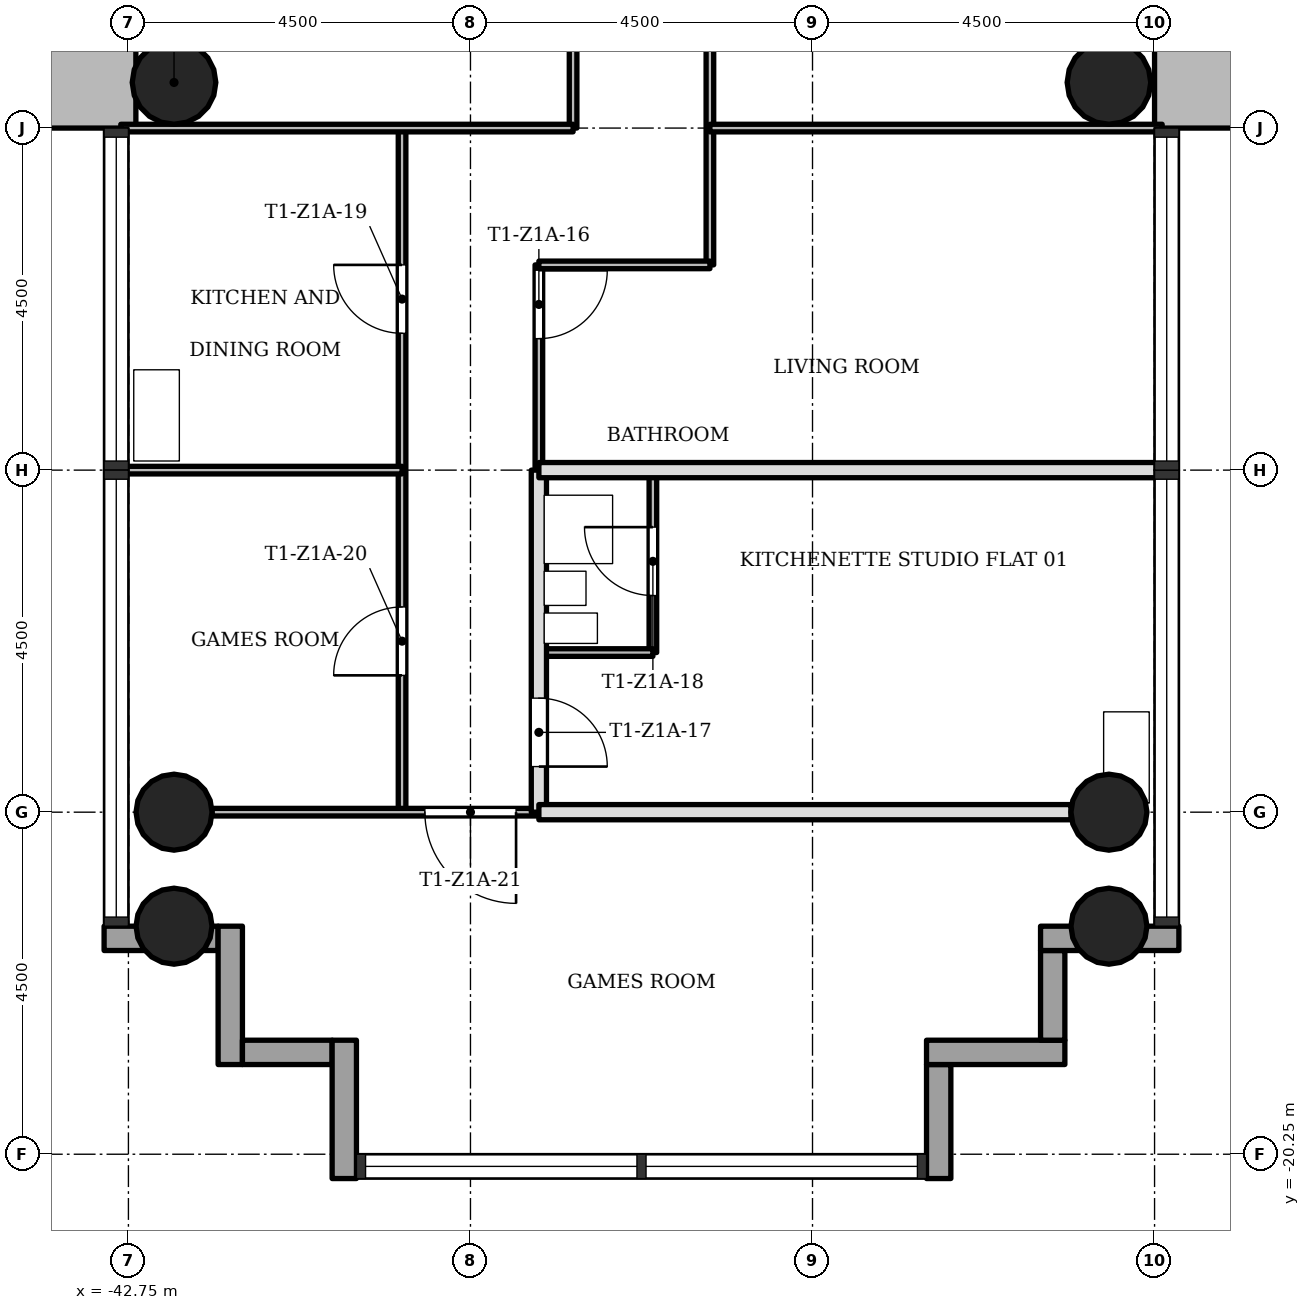
"""IFC4 building model, lengths in metres.
Left out: names, types, materials, properties, quantities, classifications, styles, units other than length and angle.
Written with IfcOpenShell. Run it as: python <this file> out.ifc"""

import sys

from ifc_helpers import new_model, si_unit, direction, frame, frame_2d, origin, origin_2d, place, context, subcontext, project, spatial, rectangle, hollow_circle, extrude, element, fill, save


model = new_model("IFC4")
c1 = context("Model", 3, precision=1e-05, world=origin(), true_north=direction((0.0, 1.0)))
c2 = subcontext(c1, "Body", "Model", "MODEL_VIEW")
j1 = project(units=[si_unit("LENGTHUNIT", "METRE"), si_unit("PLANEANGLEUNIT", "RADIAN")], contexts=[c1])
p1 = place(None, origin())
s1 = spatial("IfcSite", under=j1, at=p1, CompositionType="ELEMENT")
p2 = place(p1, origin())
s2 = spatial("IfcBuilding", under=s1, at=p2, CompositionType="ELEMENT")
p3 = place(p2, frame((0.0, 0.0, 27.9)))
s3 = spatial("IfcBuildingStorey", under=s2, at=p3, CompositionType="ELEMENT", Elevation=27.9)
p4 = place(p3, frame((-28.7, 5.65, 0.0), z_axis=(0.0, 0.0, 1.0), x_axis=(0.0, -1.0, 0.0)))
e1 = element("IfcWall", 1, at=p4, inside=s3, PredefinedType="SHEAR", context=c2, shape_type="SweptSolid", body=[
    extrude(rectangle(XDim=12.4, YDim=1.1, at=frame_2d((6.2, 0.0))), origin(), (0.0, 0.0, 1.0), 3.4),
])
p5 = place(p4, frame((4.75, 0.0, 0.0)))
e2 = element("IfcOpeningElement", 2, at=p5, cuts=e1, PredefinedType="OPENING", context=c2, shape_type="SweptSolid", body=[
    extrude(rectangle(XDim=1.8, YDim=2.1, at=frame_2d((0.9, 1.05))), frame((0.0, 0.56, 0.0), z_axis=(0.0, -1.0, 0.0), x_axis=(1.0, 0.0, 0.0)), (0.0, 0.0, 1.0), 1.12),
])
p6 = place(p3, frame((-50.65, -6.2, 0.0), z_axis=(0.0, 0.0, 1.0), x_axis=(1.0, 0.0, 0.0)))
e3 = element("IfcWall", 3, at=p6, inside=s3, PredefinedType="SHEAR", context=c2, shape_type="SweptSolid", body=[
    extrude(rectangle(XDim=7.998, YDim=1.1, at=frame_2d((3.999, 0.0))), origin(), (0.0, 0.0, 1.0), 3.4),
])
for number, where, z_axis, x_axis in (
    (4, (-42.15, -15.75, 0.0), (0.0, 0.0, 1.0), (1.0, 0.0, 0.0)),
    (5, (-29.85, -15.75, 0.0), (0.0, 0.0, 1.0), (1.0, 0.0, 0.0)),
    (6, (-42.15, -17.25, 0.0), (0.0, 0.0, 1.0), (1.0, 0.0, 0.0)),
    (7, (-29.85, -17.25, 0.0), (0.0, 0.0, 1.0), (1.0, 0.0, 0.0)),
):
    element("IfcColumn", number, at=place(p3, frame(where, z_axis=z_axis, x_axis=x_axis)), inside=s3, PredefinedType="COLUMN", context=c2, shape_type="SweptSolid", body=[
        extrude(hollow_circle(Radius=0.5, WallThickness=0.036, at=origin_2d()), origin(), (0.0, 0.0, 1.0), 3.4),
    ])
for number, where, z_axis, x_axis in (
    (8, (-42.15, -6.15, 0.0), (0.0, 0.0, 1.0), (1.0, 0.0, 0.0)),
    (9, (-29.85, -6.15, 0.0), (0.0, 0.0, 1.0), (1.0, 0.0, 0.0)),
):
    element("IfcColumn", number, at=place(p3, frame(where, z_axis=z_axis, x_axis=x_axis)), inside=s3, PredefinedType="COLUMN", context=c2, shape_type="SweptSolid", body=[
        extrude(hollow_circle(Radius=0.55, WallThickness=0.04, at=origin_2d()), origin(), (0.0, 0.0, 1.0), 3.4),
    ])
p7 = place(p3, frame((-43.07, -17.41, -0.3), z_axis=(0.0, 0.0, 1.0), x_axis=(1.0, 0.0, 0.0)))
e10 = element("IfcWall", 10, at=p7, inside=s3, PredefinedType="STANDARD", context=c2, shape_type="SweptSolid", body=[
    extrude(rectangle(XDim=1.5, YDim=0.32, at=frame_2d((0.75, 0.0))), origin(), (0.0, 0.0, 1.0), 3.4),
])
p8 = place(p3, frame((-41.41, -17.25, -0.3), z_axis=(0.0, 0.0, 1.0), x_axis=(0.0, -1.0, 0.0)))
e11 = element("IfcWall", 11, at=p8, inside=s3, PredefinedType="STANDARD", context=c2, shape_type="SweptSolid", body=[
    extrude(rectangle(XDim=1.82, YDim=0.32, at=frame_2d((0.91, 0.0))), origin(), (0.0, 0.0, 1.0), 3.4),
])
p9 = place(p3, frame((-41.25, -18.91, -0.3), z_axis=(0.0, 0.0, 1.0), x_axis=(1.0, 0.0, 0.0)))
e12 = element("IfcWall", 12, at=p9, inside=s3, PredefinedType="STANDARD", context=c2, shape_type="SweptSolid", body=[
    extrude(rectangle(XDim=1.18, YDim=0.32, at=frame_2d((0.59, 0.0))), origin(), (0.0, 0.0, 1.0), 3.4),
])
p10 = place(p3, frame((-39.91, -18.75, -0.3), z_axis=(0.0, 0.0, 1.0), x_axis=(0.0, -1.0, 0.0)))
e13 = element("IfcWall", 13, at=p10, inside=s3, PredefinedType="STANDARD", context=c2, shape_type="SweptSolid", body=[
    extrude(rectangle(XDim=1.82, YDim=0.32, at=frame_2d((0.91, 0.0))), origin(), (0.0, 0.0, 1.0), 3.4),
])
p11 = place(p3, frame((-32.09, -20.57, -0.3), z_axis=(0.0, 0.0, 1.0), x_axis=(0.0, 1.0, 0.0)))
e14 = element("IfcWall", 14, at=p11, inside=s3, PredefinedType="STANDARD", context=c2, shape_type="SweptSolid", body=[
    extrude(rectangle(XDim=1.5, YDim=0.32, at=frame_2d((0.75, 0.0))), origin(), (0.0, 0.0, 1.0), 3.4),
])
p12 = place(p3, frame((-32.25, -18.91, -0.3), z_axis=(0.0, 0.0, 1.0), x_axis=(1.0, 0.0, 0.0)))
e15 = element("IfcWall", 15, at=p12, inside=s3, PredefinedType="STANDARD", context=c2, shape_type="SweptSolid", body=[
    extrude(rectangle(XDim=1.82, YDim=0.32, at=frame_2d((0.91, 0.0))), origin(), (0.0, 0.0, 1.0), 3.4),
])
p13 = place(p3, frame((-30.59, -18.75, -0.3), z_axis=(0.0, 0.0, 1.0), x_axis=(0.0, 1.0, 0.0)))
e16 = element("IfcWall", 16, at=p13, inside=s3, PredefinedType="STANDARD", context=c2, shape_type="SweptSolid", body=[
    extrude(rectangle(XDim=1.18, YDim=0.32, at=frame_2d((0.59, 0.0))), origin(), (0.0, 0.0, 1.0), 3.4),
])
p14 = place(p3, frame((-30.75, -17.41, -0.3), z_axis=(0.0, 0.0, 1.0), x_axis=(1.0, 0.0, 0.0)))
e17 = element("IfcWall", 17, at=p14, inside=s3, PredefinedType="STANDARD", context=c2, shape_type="SweptSolid", body=[
    extrude(rectangle(XDim=1.82, YDim=0.32, at=frame_2d((0.91, 0.0))), origin(), (0.0, 0.0, 1.0), 3.4),
])
p15 = place(p3, frame((-39.15, -15.75, 0.0), z_axis=(0.0, 0.0, 1.0), x_axis=(0.0, 1.0, 0.0)))
e18 = element("IfcWall", 18, at=p15, inside=s3, PredefinedType="PARTITIONING", context=c2, shape_type="SweptSolid", body=[
    extrude(rectangle(XDim=9.0, YDim=0.1, at=frame_2d((4.5, 0.0))), origin(), (0.0, 0.0, 1.0), 3.0),
])
p16 = place(p15, frame((6.3, 0.0, 0.0)))
e19 = element("IfcOpeningElement", 19, at=p16, cuts=e18, PredefinedType="OPENING", context=c2, shape_type="SweptSolid", body=[
    extrude(rectangle(XDim=0.9, YDim=2.1, at=frame_2d((0.45, 1.05))), frame((0.0, 0.06, 0.0), z_axis=(0.0, -1.0, 0.0), x_axis=(1.0, 0.0, 0.0)), (0.0, 0.0, 1.0), 0.12),
])
p17 = place(p15, frame((1.8, 0.0, 0.0)))
e20 = element("IfcOpeningElement", 20, at=p17, cuts=e18, PredefinedType="OPENING", context=c2, shape_type="SweptSolid", body=[
    extrude(rectangle(XDim=0.9, YDim=2.1, at=frame_2d((0.45, 1.05))), frame((0.0, 0.06, 0.0), z_axis=(0.0, -1.0, 0.0), x_axis=(1.0, 0.0, 0.0)), (0.0, 0.0, 1.0), 0.12),
])
p18 = place(p3, frame((-37.35, -11.25, 0.0), z_axis=(0.0, 0.0, 1.0), x_axis=(0.0, 1.0, 0.0)))
e21 = element("IfcWall", 21, at=p18, inside=s3, PredefinedType="PARTITIONING", context=c2, shape_type="SweptSolid", body=[
    extrude(rectangle(XDim=2.7, YDim=0.1, at=frame_2d((1.35, 0.0))), origin(), (0.0, 0.0, 1.0), 3.0),
])
p19 = place(p18, frame((1.73, 0.0, 0.0)))
e22 = element("IfcOpeningElement", 22, at=p19, cuts=e21, PredefinedType="OPENING", context=c2, shape_type="SweptSolid", body=[
    extrude(rectangle(XDim=0.9, YDim=2.1, at=frame_2d((0.45, 1.05))), frame((0.0, 0.06, 0.0), z_axis=(0.0, -1.0, 0.0), x_axis=(1.0, 0.0, 0.0)), (0.0, 0.0, 1.0), 0.12),
])
p20 = place(p3, frame((-37.35, -15.75, 0.0), z_axis=(0.0, 0.0, 1.0), x_axis=(0.0, 1.0, 0.0)))
e23 = element("IfcWall", 23, at=p20, inside=s3, PredefinedType="SOLIDWALL", context=c2, shape_type="SweptSolid", body=[
    extrude(rectangle(XDim=4.5, YDim=0.2, at=frame_2d((2.25, 0.0))), origin(), (0.0, 0.0, 1.0), 3.0),
])
p21 = place(p20, frame((0.6, 0.0, 0.0)))
e24 = element("IfcOpeningElement", 24, at=p21, cuts=e23, PredefinedType="OPENING", context=c2, shape_type="SweptSolid", body=[
    extrude(rectangle(XDim=0.9, YDim=2.1, at=frame_2d((0.45, 1.05))), frame((0.0, 0.11, 0.0), z_axis=(0.0, -1.0, 0.0), x_axis=(1.0, 0.0, 0.0)), (0.0, 0.0, 1.0), 0.22),
])
p22 = place(p3, frame((-36.9, -6.75, 0.0), z_axis=(0.0, 0.0, 1.0), x_axis=(0.0, 1.0, 0.0)))
e25 = element("IfcWall", 25, at=p22, inside=s3, PredefinedType="PARTITIONING", context=c2, shape_type="SweptSolid", body=[
    extrude(rectangle(XDim=5.25, YDim=0.1, at=frame_2d((2.625, 0.0))), origin(), (0.0, 0.0, 1.0), 3.0),
])
p23 = place(p3, frame((-35.85, -13.65, 0.0), z_axis=(0.0, 0.0, 1.0), x_axis=(0.0, 1.0, 0.0)))
e26 = element("IfcWall", 26, at=p23, inside=s3, PredefinedType="PARTITIONING", context=c2, shape_type="SweptSolid", body=[
    extrude(rectangle(XDim=2.4, YDim=0.1, at=frame_2d((1.2, 0.0))), origin(), (0.0, 0.0, 1.0), 3.0),
])
p24 = place(p23, frame((0.75, 0.0, 0.0)))
e27 = element("IfcOpeningElement", 27, at=p24, cuts=e26, PredefinedType="OPENING", context=c2, shape_type="SweptSolid", body=[
    extrude(rectangle(XDim=0.9, YDim=2.1, at=frame_2d((0.45, 1.05))), frame((0.0, 0.06, 0.0), z_axis=(0.0, -1.0, 0.0), x_axis=(1.0, 0.0, 0.0)), (0.0, 0.0, 1.0), 0.12),
])
p25 = place(p3, frame((-35.1, -8.55, 0.0), z_axis=(0.0, 0.0, 1.0), x_axis=(0.0, 1.0, 0.0)))
e28 = element("IfcWall", 28, at=p25, inside=s3, PredefinedType="PARTITIONING", context=c2, shape_type="SweptSolid", body=[
    extrude(rectangle(XDim=7.05, YDim=0.1, at=frame_2d((3.525, 0.0))), origin(), (0.0, 0.0, 1.0), 3.0),
])
p26 = place(p3, frame((-41.65, -15.75, 0.0), z_axis=(0.0, 0.0, 1.0), x_axis=(1.0, 0.0, 0.0)))
e29 = element("IfcWall", 29, at=p26, inside=s3, PredefinedType="PARTITIONING", context=c2, shape_type="SweptSolid", body=[
    extrude(rectangle(XDim=4.3, YDim=0.1, at=frame_2d((2.15, 0.0))), origin(), (0.0, 0.0, 1.0), 3.0),
])
p27 = place(p26, frame((2.8, 0.0, 0.0)))
e30 = element("IfcOpeningElement", 30, at=p27, cuts=e29, PredefinedType="OPENING", context=c2, shape_type="SweptSolid", body=[
    extrude(rectangle(XDim=1.2, YDim=2.1, at=frame_2d((0.6, 1.05))), frame((0.0, 0.06, 0.0), z_axis=(0.0, -1.0, 0.0), x_axis=(1.0, 0.0, 0.0)), (0.0, 0.0, 1.0), 0.12),
])
p28 = place(p3, frame((-37.35, -15.75, 0.0), z_axis=(0.0, 0.0, 1.0), x_axis=(1.0, 0.0, 0.0)))
e31 = element("IfcWall", 31, at=p28, inside=s3, PredefinedType="SOLIDWALL", context=c2, shape_type="SweptSolid", body=[
    extrude(rectangle(XDim=7.0, YDim=0.2, at=frame_2d((3.5, 0.0))), origin(), (0.0, 0.0, 1.0), 3.0),
])
p29 = place(p3, frame((-37.35, -13.65, 0.0), z_axis=(0.0, 0.0, 1.0), x_axis=(1.0, 0.0, 0.0)))
e32 = element("IfcWall", 32, at=p29, inside=s3, PredefinedType="PARTITIONING", context=c2, shape_type="SweptSolid", body=[
    extrude(rectangle(XDim=1.5, YDim=0.1, at=frame_2d((0.75, 0.0))), origin(), (0.0, 0.0, 1.0), 3.0),
])
p30 = place(p3, frame((-42.85, -11.25, 0.0), z_axis=(0.0, 0.0, 1.0), x_axis=(1.0, 0.0, 0.0)))
e33 = element("IfcWall", 33, at=p30, inside=s3, PredefinedType="PARTITIONING", context=c2, shape_type="SweptSolid", body=[
    extrude(rectangle(XDim=3.7, YDim=0.1, at=frame_2d((1.85, 0.0))), origin(), (0.0, 0.0, 1.0), 3.0),
])
p31 = place(p3, frame((-37.35, -11.25, 0.0), z_axis=(0.0, 0.0, 1.0), x_axis=(1.0, 0.0, 0.0)))
e34 = element("IfcWall", 34, at=p31, inside=s3, PredefinedType="SOLIDWALL", context=c2, shape_type="SweptSolid", body=[
    extrude(rectangle(XDim=8.2, YDim=0.2, at=frame_2d((4.1, 0.0))), origin(), (0.0, 0.0, 1.0), 3.0),
])
p32 = place(p3, frame((-37.35, -8.55, 0.0), z_axis=(0.0, 0.0, 1.0), x_axis=(1.0, 0.0, 0.0)))
e35 = element("IfcWall", 35, at=p32, inside=s3, PredefinedType="PARTITIONING", context=c2, shape_type="SweptSolid", body=[
    extrude(rectangle(XDim=2.25, YDim=0.1, at=frame_2d((1.125, 0.0))), origin(), (0.0, 0.0, 1.0), 3.0),
])
for number, where, z_axis, x_axis in (
    (36, (-42.85, -6.75, 0.0), (0.0, 0.0, 1.0), (1.0, 0.0, 0.0)),
    (37, (-35.1, -6.75, 0.0), (0.0, 0.0, 1.0), (1.0, 0.0, 0.0)),
):
    element("IfcWall", number, at=place(p3, frame(where, z_axis=z_axis, x_axis=x_axis)), inside=s3, PredefinedType="PARTITIONING", context=c2, shape_type="SweptSolid", body=[
        extrude(rectangle(XDim=5.95, YDim=0.1, at=frame_2d((2.975, 0.0))), origin(), (0.0, 0.0, 1.0), 3.0),
    ])
p33 = place(p19, origin())
e38 = element("IfcDoor", 38, at=p33, inside=s3, OperationType="SINGLE_SWING_RIGHT", PredefinedType="DOOR", context=c2, shape_type="SweptSolid", body=[
    extrude(rectangle(XDim=0.9, YDim=2.1, at=frame_2d((0.45, 1.05))), frame((0.0, 0.025, 0.0), z_axis=(0.0, -1.0, 0.0), x_axis=(1.0, 0.0, 0.0)), (0.0, 0.0, 1.0), 0.05),
])
fill(e22, e38)
p34 = place(p21, origin())
e39 = element("IfcDoor", 39, at=p34, inside=s3, OperationType="SINGLE_SWING_LEFT", PredefinedType="DOOR", context=c2, shape_type="SweptSolid", body=[
    extrude(rectangle(XDim=0.9, YDim=2.1, at=frame_2d((0.45, 1.05))), frame((0.0, 0.025, 0.0), z_axis=(0.0, -1.0, 0.0), x_axis=(1.0, 0.0, 0.0)), (0.0, 0.0, 1.0), 0.05),
])
fill(e24, e39)
p35 = place(p24, origin())
e40 = element("IfcDoor", 40, at=p35, inside=s3, OperationType="SINGLE_SWING_LEFT", PredefinedType="DOOR", context=c2, shape_type="SweptSolid", body=[
    extrude(rectangle(XDim=0.9, YDim=2.1, at=frame_2d((0.45, 1.05))), frame((0.0, 0.025, 0.0), z_axis=(0.0, -1.0, 0.0), x_axis=(1.0, 0.0, 0.0)), (0.0, 0.0, 1.0), 0.05),
])
fill(e27, e40)
p36 = place(p16, origin())
e41 = element("IfcDoor", 41, at=p36, inside=s3, OperationType="SINGLE_SWING_LEFT", PredefinedType="DOOR", context=c2, shape_type="SweptSolid", body=[
    extrude(rectangle(XDim=0.9, YDim=2.1, at=frame_2d((0.45, 1.05))), frame((0.0, 0.025, 0.0), z_axis=(0.0, -1.0, 0.0), x_axis=(1.0, 0.0, 0.0)), (0.0, 0.0, 1.0), 0.05),
])
fill(e19, e41)
p37 = place(p17, origin())
e42 = element("IfcDoor", 42, at=p37, inside=s3, OperationType="SINGLE_SWING_RIGHT", PredefinedType="DOOR", context=c2, shape_type="SweptSolid", body=[
    extrude(rectangle(XDim=0.9, YDim=2.1, at=frame_2d((0.45, 1.05))), frame((0.0, 0.025, 0.0), z_axis=(0.0, -1.0, 0.0), x_axis=(1.0, 0.0, 0.0)), (0.0, 0.0, 1.0), 0.05),
])
fill(e20, e42)
p38 = place(p27, origin())
e43 = element("IfcDoor", 43, at=p38, inside=s3, OperationType="SINGLE_SWING_RIGHT", PredefinedType="DOOR", context=c2, shape_type="SweptSolid", body=[
    extrude(rectangle(XDim=1.2, YDim=2.1, at=frame_2d((0.6, 1.05))), frame((0.0, 0.025, 0.0), z_axis=(0.0, -1.0, 0.0), x_axis=(1.0, 0.0, 0.0)), (0.0, 0.0, 1.0), 0.05),
])
fill(e30, e43)
save(model, sys.argv[1])
